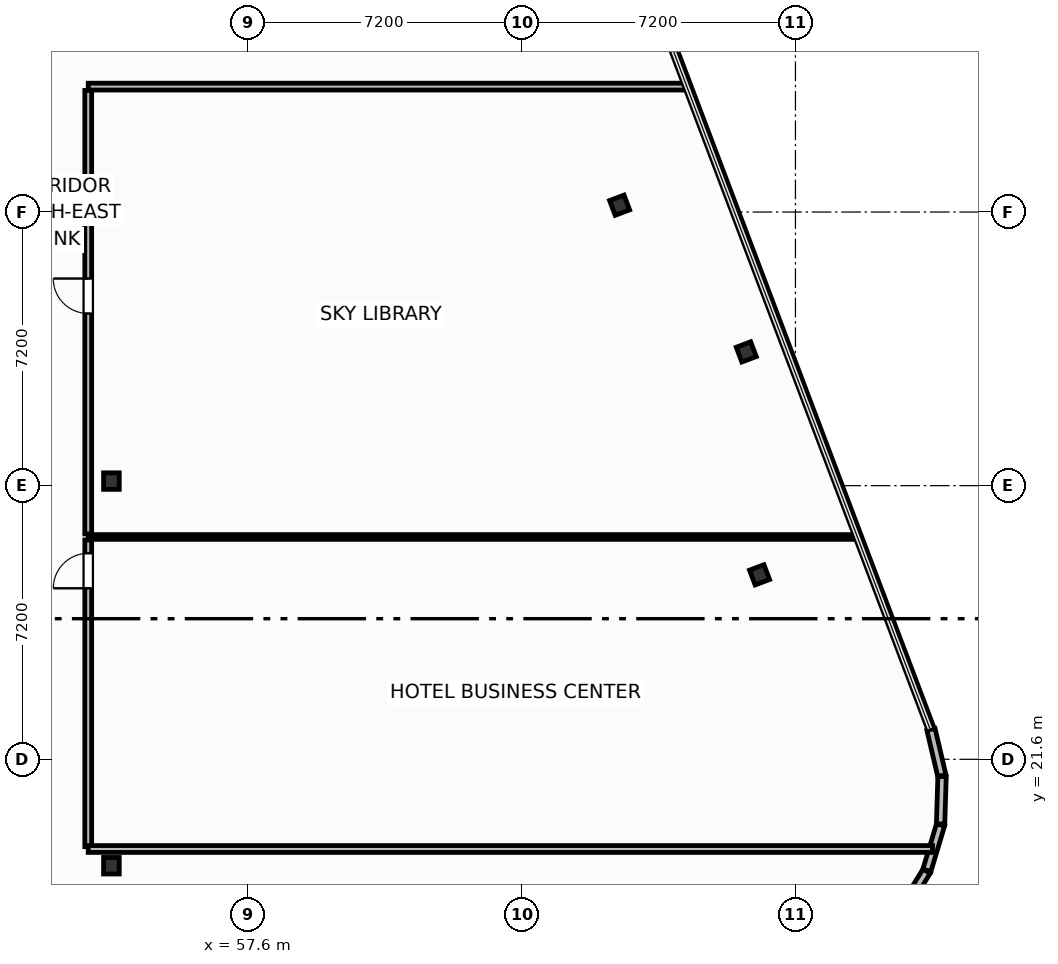
"""IFC4 building model, lengths in metres.
Left out: names, types, materials, properties, quantities, classifications, styles, units other than length and angle.
Written with IfcOpenShell. Run it as: python <this file> out.ifc"""

import sys

from ifc_helpers import new_model, si_unit, direction, frame, frame_2d, origin, origin_2d, place, context, subcontext, project, spatial, rectangle, i_section, extrude, element, fill, save


model = new_model("IFC4")
c1 = context("Model", 3, precision=1e-05, world=origin(), true_north=direction((0.0, 1.0)))
c2 = subcontext(c1, "Body", "Model", "MODEL_VIEW")
j1 = project(units=[si_unit("LENGTHUNIT", "METRE"), si_unit("PLANEANGLEUNIT", "RADIAN")], contexts=[c1])
p1 = place(None, origin())
s1 = spatial("IfcSite", under=j1, at=p1, CompositionType="ELEMENT")
p2 = place(p1, origin())
s2 = spatial("IfcBuilding", under=s1, at=p2, CompositionType="ELEMENT")
p3 = place(p2, frame((0.0, 0.0, 231.2)))
s3 = spatial("IfcBuildingStorey", under=s2, at=p3, CompositionType="ELEMENT", Elevation=231.2)
for number, where, z_axis, x_axis in (
    (1, (54.0, 18.8, 0.0), (0.0, 0.0, 1.0), (1.0, 0.0, 0.0)),
    (2, (54.0, 28.92, 0.0), (0.0, 0.0, 1.0), (1.0, 0.0, 0.0)),
):
    element("IfcColumn", number, at=place(p3, frame(where, z_axis=z_axis, x_axis=x_axis)), inside=s3, PredefinedType="COLUMN", context=c2, shape_type="SweptSolid", body=[
        extrude(i_section(OverallWidth=0.412, OverallDepth=0.435, WebThickness=0.036, FlangeThickness=0.057, FilletRadius=0.025, at=origin_2d()), origin(), (0.0, 0.0, 1.0), 3.7),
    ])
for number, where, z_axis, x_axis in (
    (3, (71.055, 26.453, 0.0), (0.0, 0.0, 1.0), (0.935, 0.354, 0.0)),
    (4, (70.706, 32.32, 0.0), (0.0, 0.0, 1.0), (0.935, 0.354, 0.0)),
    (5, (67.373, 36.18, 0.0), (0.0, 0.0, 1.0), (0.935, 0.354, 0.0)),
):
    element("IfcColumn", number, at=place(p3, frame(where, z_axis=z_axis, x_axis=x_axis)), inside=s3, PredefinedType="COLUMN", context=c2, shape_type="SweptSolid", body=[
        extrude(i_section(OverallWidth=0.406, OverallDepth=0.416, WebThickness=0.03, FlangeThickness=0.048, FilletRadius=0.025, at=origin_2d()), origin(), (0.0, 0.0, 1.0), 3.7),
    ])
for number, where, z_axis, x_axis in (
    (6, (74.794, 17.593, 0.0), (0.0, 0.0, 1.0), (0.527, 0.85, 0.0)),
    (7, (75.458, 18.679, 0.0), (0.0, 0.0, 1.0), (0.288, 0.958, 0.0)),
):
    element("IfcWall", number, at=place(p3, frame(where, z_axis=z_axis, x_axis=x_axis)), inside=s3, PredefinedType="SOLIDWALL", context=c2, shape_type="SweptSolid", body=[
        extrude(rectangle(XDim=1.249, YDim=0.22, at=frame_2d((0.624, 0.0))), origin(), (0.0, 0.0, 1.0), 2.73),
    ])
p4 = place(p3, frame((75.819, 19.899, 0.0), z_axis=(0.0, 0.0, 1.0), x_axis=(0.030898954628, 0.999522513305, 0.0)))
e8 = element("IfcWall", 8, at=p4, inside=s3, PredefinedType="SOLIDWALL", context=c2, shape_type="SweptSolid", body=[
    extrude(rectangle(XDim=1.248, YDim=0.22, at=frame_2d((0.624, 0.0))), origin(), (0.0, 0.0, 1.0), 2.73),
])
p5 = place(p3, frame((75.852, 21.172, 0.0), z_axis=(0.0, 0.0, 1.0), x_axis=(-0.228941257463, 0.973440239887, 0.0)))
e9 = element("IfcWall", 9, at=p5, inside=s3, PredefinedType="SOLIDWALL", context=c2, shape_type="SweptSolid", body=[
    extrude(rectangle(XDim=1.249, YDim=0.22, at=frame_2d((0.625, 0.0))), origin(), (0.0, 0.0, 1.0), 2.73),
])
p6 = place(p3, frame((53.39, 19.3, 0.0), z_axis=(0.0, 0.0, 1.0), x_axis=(0.0, 1.0, 0.0)))
e10 = element("IfcWall", 10, at=p6, inside=s3, PredefinedType="PARTITIONING", context=c2, shape_type="SweptSolid", body=[
    extrude(rectangle(XDim=8.07, YDim=0.18, at=frame_2d((4.035, 0.0))), origin(), (0.0, 0.0, 1.0), 3.45),
])
p7 = place(p6, frame((6.8, 0.0, 0.0)))
e11 = element("IfcOpeningElement", 11, at=p7, cuts=e10, PredefinedType="OPENING", context=c2, shape_type="SweptSolid", body=[
    extrude(rectangle(XDim=0.92, YDim=2.05, at=frame_2d((0.46, 1.025))), frame((0.0, 0.1, 0.0), z_axis=(0.0, -1.0, 0.0), x_axis=(1.0, 0.0, 0.0)), (0.0, 0.0, 1.0), 0.2),
])
p8 = place(p3, frame((53.39, 27.53, 0.0), z_axis=(0.0, 0.0, 1.0), x_axis=(0.0, 1.0, 0.0)))
e12 = element("IfcWall", 12, at=p8, inside=s3, PredefinedType="PARTITIONING", context=c2, shape_type="SweptSolid", body=[
    extrude(rectangle(XDim=11.67, YDim=0.18, at=frame_2d((5.835, 0.0))), origin(), (0.0, 0.0, 1.0), 3.45),
])
p9 = place(p8, frame((5.8, 0.0, 0.0)))
e13 = element("IfcOpeningElement", 13, at=p9, cuts=e12, PredefinedType="OPENING", context=c2, shape_type="SweptSolid", body=[
    extrude(rectangle(XDim=0.92, YDim=2.05, at=frame_2d((0.46, 1.025))), frame((0.0, 0.1, 0.0), z_axis=(0.0, -1.0, 0.0), x_axis=(1.0, 0.0, 0.0)), (0.0, 0.0, 1.0), 0.2),
])
p10 = place(p3, frame((53.39, 27.45, 0.0), z_axis=(0.0, 0.0, 1.0), x_axis=(1.0, 0.0, 0.0)))
e14 = element("IfcWall", 14, at=p10, inside=s3, PredefinedType="PARTITIONING", context=c2, shape_type="SweptSolid", body=[
    extrude(rectangle(XDim=20.199, YDim=0.125, at=frame_2d((10.1, 0.0))), origin(), (0.0, 0.0, 1.0), 2.739),
])
p11 = place(p3, frame((53.39, 19.24, 0.0), z_axis=(0.0, 0.0, 1.0), x_axis=(1.0, 0.0, 0.0)))
e15 = element("IfcWall", 15, at=p11, inside=s3, PredefinedType="PARTITIONING", context=c2, shape_type="SweptSolid", body=[
    extrude(rectangle(XDim=22.217, YDim=0.18, at=frame_2d((11.108, 0.0))), origin(), (0.0, 0.0, 1.0), 3.45),
])
p12 = place(p3, frame((53.39, 39.3, 0.0), z_axis=(0.0, 0.0, 1.0), x_axis=(1.0, 0.0, 0.0)))
e16 = element("IfcWall", 16, at=p12, inside=s3, PredefinedType="PARTITIONING", context=c2, shape_type="SweptSolid", body=[
    extrude(rectangle(XDim=15.713, YDim=0.18, at=frame_2d((7.856, 0.0))), origin(), (0.0, 0.0, 1.0), 3.45),
])
p13 = place(p7, origin())
e17 = element("IfcDoor", 17, at=p13, inside=s3, OperationType="SINGLE_SWING_LEFT", PredefinedType="DOOR", context=c2, shape_type="SweptSolid", body=[
    extrude(rectangle(XDim=0.92, YDim=2.05, at=frame_2d((0.46, 1.025))), frame((0.0, 0.025, 0.0), z_axis=(0.0, -1.0, 0.0), x_axis=(1.0, 0.0, 0.0)), (0.0, 0.0, 1.0), 0.05),
])
fill(e11, e17)
p14 = place(p9, origin())
e18 = element("IfcDoor", 18, at=p14, inside=s3, OperationType="SINGLE_SWING_RIGHT", PredefinedType="DOOR", context=c2, shape_type="SweptSolid", body=[
    extrude(rectangle(XDim=0.92, YDim=2.05, at=frame_2d((0.46, 1.025))), frame((0.0, 0.025, 0.0), z_axis=(0.0, -1.0, 0.0), x_axis=(1.0, 0.0, 0.0)), (0.0, 0.0, 1.0), 0.05),
])
fill(e13, e18)
save(model, sys.argv[1])
